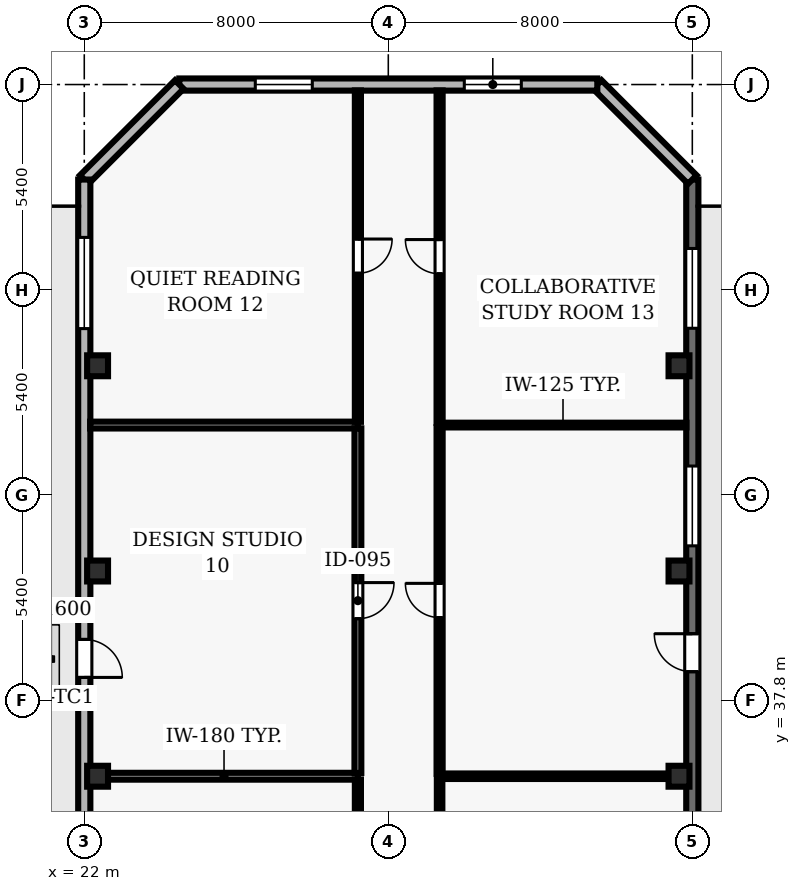
"""IFC4 building model, lengths in metres.
Left out: names, types, materials, properties, quantities, classifications, styles, units other than length and angle.
Written with IfcOpenShell. Run it as: python <this file> out.ifc"""

import sys

from ifc_helpers import new_model, si_unit, direction, frame, frame_2d, origin, origin_2d, place, context, subcontext, project, spatial, rectangle, hollow_rectangle, extrude, element, fill, save


model = new_model("IFC4")
c1 = context("Model", 3, precision=1e-05, world=origin(), true_north=direction((0.0, 1.0)))
c2 = subcontext(c1, "Body", "Model", "MODEL_VIEW")
j1 = project(units=[si_unit("LENGTHUNIT", "METRE"), si_unit("PLANEANGLEUNIT", "RADIAN")], contexts=[c1])
p1 = place(None, origin())
s1 = spatial("IfcSite", under=j1, at=p1, CompositionType="ELEMENT")
p2 = place(p1, origin())
s2 = spatial("IfcBuilding", under=s1, at=p2, CompositionType="ELEMENT")
p3 = place(p2, frame((0.0, 0.0, 34.9)))
s3 = spatial("IfcBuildingStorey", under=s2, at=p3, CompositionType="ELEMENT", Elevation=34.9)
for number, where, z_axis, x_axis in (
    (1, (22.35, 35.8, 0.0), (0.0, 0.0, 1.0), (1.0, 0.0, 0.0)),
    (2, (37.65, 35.8, 0.0), (0.0, 0.0, 1.0), (1.0, 0.0, 0.0)),
    (3, (22.35, 41.2, 0.0), (0.0, 0.0, 1.0), (1.0, 0.0, 0.0)),
    (4, (37.65, 41.2, 0.0), (0.0, 0.0, 1.0), (1.0, 0.0, 0.0)),
    (5, (22.35, 46.6, 0.0), (0.0, 0.0, 1.0), (1.0, 0.0, 0.0)),
    (6, (37.65, 46.6, 0.0), (0.0, 0.0, 1.0), (1.0, 0.0, 0.0)),
):
    element("IfcColumn", number, at=place(p3, frame(where, z_axis=z_axis, x_axis=x_axis)), inside=s3, PredefinedType="COLUMN", context=c2, shape_type="SweptSolid", body=[
        extrude(hollow_rectangle(XDim=0.55, YDim=0.55, WallThickness=0.025, at=origin_2d()), origin(), (0.0, 0.0, 1.0), 3.9),
    ])
p4 = place(p3, frame((38.0, 28.6, 0.0), z_axis=(0.0, 0.0, 1.0), x_axis=(0.0, 1.0, 0.0)))
e7 = element("IfcWall", 7, at=p4, inside=s3, PredefinedType="SOLIDWALL", context=c2, shape_type="SweptSolid", body=[
    extrude(rectangle(XDim=22.9, YDim=0.32, at=frame_2d((11.45, 0.0))), origin(), (0.0, 0.0, 1.0), 3.69),
])
p5 = place(p4, frame((9.95, 0.0, 0.0)))
e8 = element("IfcOpeningElement", 8, at=p5, cuts=e7, PredefinedType="OPENING", context=c2, shape_type="SweptSolid", body=[
    extrude(rectangle(XDim=1.0, YDim=2.2, at=frame_2d((0.5, 1.1))), frame((0.0, 0.17, 0.0), z_axis=(0.0, -1.0, 0.0), x_axis=(1.0, 0.0, 0.0)), (0.0, 0.0, 1.0), 0.34),
])
p6 = place(p4, frame((2.262, 0.0, 0.9)))
e9 = element("IfcOpeningElement", 9, at=p6, cuts=e7, PredefinedType="OPENING", context=c2, shape_type="SweptSolid", body=[
    extrude(rectangle(XDim=2.1, YDim=1.6, at=frame_2d((1.05, 0.8))), frame((0.0, 0.17, 0.0), z_axis=(0.0, -1.0, 0.0), x_axis=(1.0, 0.0, 0.0)), (0.0, 0.0, 1.0), 0.34),
])
p7 = place(p4, frame((13.262, 0.0, 0.9)))
e10 = element("IfcOpeningElement", 10, at=p7, cuts=e7, PredefinedType="OPENING", context=c2, shape_type="SweptSolid", body=[
    extrude(rectangle(XDim=2.1, YDim=1.6, at=frame_2d((1.05, 0.8))), frame((0.0, 0.17, 0.0), z_axis=(0.0, -1.0, 0.0), x_axis=(1.0, 0.0, 0.0)), (0.0, 0.0, 1.0), 0.34),
])
p8 = place(p4, frame((18.987, 0.0, 0.9)))
e11 = element("IfcOpeningElement", 11, at=p8, cuts=e7, PredefinedType="OPENING", context=c2, shape_type="SweptSolid", body=[
    extrude(rectangle(XDim=2.1, YDim=1.6, at=frame_2d((1.05, 0.8))), frame((0.0, 0.17, 0.0), z_axis=(0.0, -1.0, 0.0), x_axis=(1.0, 0.0, 0.0)), (0.0, 0.0, 1.0), 0.34),
])
p9 = place(p3, frame((38.0, 51.5, 0.0), z_axis=(0.0, 0.0, 1.0), x_axis=(-0.707106781187, 0.707106781187, 0.0)))
e12 = element("IfcWall", 12, at=p9, inside=s3, PredefinedType="SOLIDWALL", context=c2, shape_type="SweptSolid", body=[
    extrude(rectangle(XDim=3.536, YDim=0.32, at=frame_2d((1.768, 0.0))), origin(), (0.0, 0.0, 1.0), 3.69),
])
p10 = place(p3, frame((35.5, 54.0, 0.0), z_axis=(0.0, 0.0, 1.0), x_axis=(-1.0, 0.0, 0.0)))
e13 = element("IfcWall", 13, at=p10, inside=s3, PredefinedType="SOLIDWALL", context=c2, shape_type="SweptSolid", body=[
    extrude(rectangle(XDim=11.0, YDim=0.32, at=frame_2d((5.5, 0.0))), origin(), (0.0, 0.0, 1.0), 3.69),
])
p11 = place(p10, frame((2.0, 0.0, 0.9)))
e14 = element("IfcOpeningElement", 14, at=p11, cuts=e13, PredefinedType="OPENING", context=c2, shape_type="SweptSolid", body=[
    extrude(rectangle(XDim=1.5, YDim=1.8, at=frame_2d((0.75, 0.9))), frame((0.0, 0.17, 0.0), z_axis=(0.0, -1.0, 0.0), x_axis=(1.0, 0.0, 0.0)), (0.0, 0.0, 1.0), 0.34),
])
p12 = place(p10, frame((7.5, 0.0, 0.9)))
e15 = element("IfcOpeningElement", 15, at=p12, cuts=e13, PredefinedType="OPENING", context=c2, shape_type="SweptSolid", body=[
    extrude(rectangle(XDim=1.5, YDim=1.8, at=frame_2d((0.75, 0.9))), frame((0.0, 0.17, 0.0), z_axis=(0.0, -1.0, 0.0), x_axis=(1.0, 0.0, 0.0)), (0.0, 0.0, 1.0), 0.34),
])
p13 = place(p3, frame((24.5, 54.0, 0.0), z_axis=(0.0, 0.0, 1.0), x_axis=(-0.707106781187, -0.707106781187, 0.0)))
e16 = element("IfcWall", 16, at=p13, inside=s3, PredefinedType="SOLIDWALL", context=c2, shape_type="SweptSolid", body=[
    extrude(rectangle(XDim=3.536, YDim=0.32, at=frame_2d((1.768, 0.0))), origin(), (0.0, 0.0, 1.0), 3.69),
])
p14 = place(p3, frame((22.0, 51.5, 0.0), z_axis=(0.0, 0.0, 1.0), x_axis=(0.0, -1.0, 0.0)))
e17 = element("IfcWall", 17, at=p14, inside=s3, PredefinedType="SOLIDWALL", context=c2, shape_type="SweptSolid", body=[
    extrude(rectangle(XDim=49.0, YDim=0.32, at=frame_2d((24.5, 0.0))), origin(), (0.0, 0.0, 1.0), 3.69),
])
p15 = place(p14, frame((12.1, 0.0, 0.0)))
e18 = element("IfcOpeningElement", 18, at=p15, cuts=e17, PredefinedType="OPENING", context=c2, shape_type="SweptSolid", body=[
    extrude(rectangle(XDim=1.0, YDim=2.2, at=frame_2d((0.5, 1.1))), frame((0.0, 0.17, 0.0), z_axis=(0.0, -1.0, 0.0), x_axis=(1.0, 0.0, 0.0)), (0.0, 0.0, 1.0), 0.34),
])
p16 = place(p14, frame((1.522, 0.0, 0.9)))
e19 = element("IfcOpeningElement", 19, at=p16, cuts=e17, PredefinedType="OPENING", context=c2, shape_type="SweptSolid", body=[
    extrude(rectangle(XDim=2.4, YDim=1.8, at=frame_2d((1.2, 0.9))), frame((0.0, 0.17, 0.0), z_axis=(0.0, -1.0, 0.0), x_axis=(1.0, 0.0, 0.0)), (0.0, 0.0, 1.0), 0.34),
])
p17 = place(p14, frame((17.856, 0.0, 0.9)))
e20 = element("IfcOpeningElement", 20, at=p17, cuts=e17, PredefinedType="OPENING", context=c2, shape_type="SweptSolid", body=[
    extrude(rectangle(XDim=2.4, YDim=1.8, at=frame_2d((1.2, 0.9))), frame((0.0, 0.17, 0.0), z_axis=(0.0, -1.0, 0.0), x_axis=(1.0, 0.0, 0.0)), (0.0, 0.0, 1.0), 0.34),
])
p18 = place(p14, frame((22.4, 0.0, 0.9)))
e21 = element("IfcOpeningElement", 21, at=p18, cuts=e17, PredefinedType="OPENING", context=c2, shape_type="SweptSolid", body=[
    extrude(rectangle(XDim=2.4, YDim=1.8, at=frame_2d((1.2, 0.9))), frame((0.0, 0.17, 0.0), z_axis=(0.0, -1.0, 0.0), x_axis=(1.0, 0.0, 0.0)), (0.0, 0.0, 1.0), 0.34),
])
p19 = place(p14, frame((29.194, 0.0, 0.9)))
e22 = element("IfcOpeningElement", 22, at=p19, cuts=e17, PredefinedType="OPENING", context=c2, shape_type="SweptSolid", body=[
    extrude(rectangle(XDim=2.4, YDim=1.8, at=frame_2d((1.2, 0.9))), frame((0.0, 0.17, 0.0), z_axis=(0.0, -1.0, 0.0), x_axis=(1.0, 0.0, 0.0)), (0.0, 0.0, 1.0), 0.34),
])
p20 = place(p14, frame((33.289, 0.0, 0.9)))
e23 = element("IfcOpeningElement", 23, at=p20, cuts=e17, PredefinedType="OPENING", context=c2, shape_type="SweptSolid", body=[
    extrude(rectangle(XDim=2.4, YDim=1.8, at=frame_2d((1.2, 0.9))), frame((0.0, 0.17, 0.0), z_axis=(0.0, -1.0, 0.0), x_axis=(1.0, 0.0, 0.0)), (0.0, 0.0, 1.0), 0.34),
])
p21 = place(p14, frame((39.633, 0.0, 0.9)))
e24 = element("IfcOpeningElement", 24, at=p21, cuts=e17, PredefinedType="OPENING", context=c2, shape_type="SweptSolid", body=[
    extrude(rectangle(XDim=2.4, YDim=1.8, at=frame_2d((1.2, 0.9))), frame((0.0, 0.17, 0.0), z_axis=(0.0, -1.0, 0.0), x_axis=(1.0, 0.0, 0.0)), (0.0, 0.0, 1.0), 0.34),
])
p22 = place(p3, frame((29.2, 35.8, 0.0), z_axis=(0.0, 0.0, 1.0), x_axis=(-1.0, 0.0, 0.0)))
e25 = element("IfcWall", 25, at=p22, inside=s3, PredefinedType="PARTITIONING", context=c2, shape_type="SweptSolid", body=[
    extrude(rectangle(XDim=7.045, YDim=0.18, at=frame_2d((3.522, 0.0))), origin(), (0.0, 0.0, 1.0), 3.055),
])
p23 = place(p3, frame((29.2, 45.04, 0.0), z_axis=(0.0, 0.0, 1.0), x_axis=(-1.0, 0.0, 0.0)))
e26 = element("IfcWall", 26, at=p23, inside=s3, PredefinedType="PARTITIONING", context=c2, shape_type="SweptSolid", body=[
    extrude(rectangle(XDim=7.045, YDim=0.18, at=frame_2d((3.522, 0.0))), origin(), (0.0, 0.0, 1.0), 3.69),
])
p24 = place(p3, frame((37.845, 35.8, 0.0), z_axis=(0.0, 0.0, 1.0), x_axis=(-1.0, 0.0, 0.0)))
e27 = element("IfcWall", 27, at=p24, inside=s3, PredefinedType="PARTITIONING", context=c2, shape_type="SweptSolid", body=[
    extrude(rectangle(XDim=6.495, YDim=0.145, at=frame_2d((3.248, 0.0))), origin(), (0.0, 0.0, 1.0), 3.055),
])
p25 = place(p3, frame((37.845, 45.04, 0.0), z_axis=(0.0, 0.0, 1.0), x_axis=(-1.0, 0.0, 0.0)))
e28 = element("IfcWall", 28, at=p25, inside=s3, PredefinedType="PARTITIONING", context=c2, shape_type="SweptSolid", body=[
    extrude(rectangle(XDim=6.495, YDim=0.125, at=frame_2d((3.248, 0.0))), origin(), (0.0, 0.0, 1.0), 3.69),
])
p26 = place(p3, frame((29.2, 35.715, 0.0), z_axis=(0.0, 0.0, 1.0), x_axis=(0.0, -1.0, 0.0)))
e29 = element("IfcWall", 29, at=p26, inside=s3, PredefinedType="PARTITIONING", context=c2, shape_type="SweptSolid", body=[
    extrude(rectangle(XDim=9.64, YDim=0.16, at=frame_2d((4.82, 0.0))), origin(), (0.0, 0.0, 1.0), 3.69),
])
p27 = place(p26, frame((4.32, 0.0, 0.0)))
e30 = element("IfcOpeningElement", 30, at=p27, cuts=e29, PredefinedType="OPENING", context=c2, shape_type="SweptSolid", body=[
    extrude(rectangle(XDim=1.0, YDim=2.1, at=frame_2d((0.5, 1.05))), frame((0.0, 0.09, 0.0), z_axis=(0.0, -1.0, 0.0), x_axis=(1.0, 0.0, 0.0)), (0.0, 0.0, 1.0), 0.18),
])
p28 = place(p3, frame((29.2, 44.955, 0.0), z_axis=(0.0, 0.0, 1.0), x_axis=(0.0, -1.0, 0.0)))
e31 = element("IfcWall", 31, at=p28, inside=s3, PredefinedType="PARTITIONING", context=c2, shape_type="SweptSolid", body=[
    extrude(rectangle(XDim=9.07, YDim=0.18, at=frame_2d((4.535, 0.0))), origin(), (0.0, 0.0, 1.0), 3.69),
])
p29 = place(p28, frame((4.06, 0.0, 0.0)))
e32 = element("IfcOpeningElement", 32, at=p29, cuts=e31, PredefinedType="OPENING", context=c2, shape_type="SweptSolid", body=[
    extrude(rectangle(XDim=0.95, YDim=2.1, at=frame_2d((0.475, 1.05))), frame((0.0, 0.1, 0.0), z_axis=(0.0, -1.0, 0.0), x_axis=(1.0, 0.0, 0.0)), (0.0, 0.0, 1.0), 0.2),
])
p30 = place(p3, frame((29.2, 53.845, 0.0), z_axis=(0.0, 0.0, 1.0), x_axis=(0.0, -1.0, 0.0)))
e33 = element("IfcWall", 33, at=p30, inside=s3, PredefinedType="PARTITIONING", context=c2, shape_type="SweptSolid", body=[
    extrude(rectangle(XDim=8.72, YDim=0.16, at=frame_2d((4.36, 0.0))), origin(), (0.0, 0.0, 1.0), 3.69),
])
p31 = place(p30, frame((3.91, 0.0, 0.0)))
e34 = element("IfcOpeningElement", 34, at=p31, cuts=e33, PredefinedType="OPENING", context=c2, shape_type="SweptSolid", body=[
    extrude(rectangle(XDim=0.9, YDim=2.1, at=frame_2d((0.45, 1.05))), frame((0.0, 0.09, 0.0), z_axis=(0.0, -1.0, 0.0), x_axis=(1.0, 0.0, 0.0)), (0.0, 0.0, 1.0), 0.18),
])
p32 = place(p3, frame((31.35, 26.075, 0.0), z_axis=(0.0, 0.0, 1.0), x_axis=(0.0, 1.0, 0.0)))
e35 = element("IfcWall", 35, at=p32, inside=s3, PredefinedType="PARTITIONING", context=c2, shape_type="SweptSolid", body=[
    extrude(rectangle(XDim=9.657, YDim=0.145, at=frame_2d((4.829, 0.0))), origin(), (0.0, 0.0, 1.0), 3.69),
])
p33 = place(p32, frame((4.279, 0.0, 0.0)))
e36 = element("IfcOpeningElement", 36, at=p33, cuts=e35, PredefinedType="OPENING", context=c2, shape_type="SweptSolid", body=[
    extrude(rectangle(XDim=1.1, YDim=2.15, at=frame_2d((0.55, 1.075))), frame((0.0, 0.083, 0.0), z_axis=(0.0, -1.0, 0.0), x_axis=(1.0, 0.0, 0.0)), (0.0, 0.0, 1.0), 0.165),
])
p34 = place(p3, frame((31.35, 35.867, 0.0), z_axis=(0.0, 0.0, 1.0), x_axis=(0.0, 1.0, 0.0)))
e37 = element("IfcWall", 37, at=p34, inside=s3, PredefinedType="PARTITIONING", context=c2, shape_type="SweptSolid", body=[
    extrude(rectangle(XDim=9.116, YDim=0.16, at=frame_2d((4.558, 0.0))), origin(), (0.0, 0.0, 1.0), 3.69),
])
p35 = place(p34, frame((4.108, 0.0, 0.0)))
e38 = element("IfcOpeningElement", 38, at=p35, cuts=e37, PredefinedType="OPENING", context=c2, shape_type="SweptSolid", body=[
    extrude(rectangle(XDim=0.9, YDim=2.1, at=frame_2d((0.45, 1.05))), frame((0.0, 0.09, 0.0), z_axis=(0.0, -1.0, 0.0), x_axis=(1.0, 0.0, 0.0)), (0.0, 0.0, 1.0), 0.18),
])
p36 = place(p3, frame((31.35, 45.097, 0.0), z_axis=(0.0, 0.0, 1.0), x_axis=(0.0, 1.0, 0.0)))
e39 = element("IfcWall", 39, at=p36, inside=s3, PredefinedType="PARTITIONING", context=c2, shape_type="SweptSolid", body=[
    extrude(rectangle(XDim=8.748, YDim=0.16, at=frame_2d((4.374, 0.0))), origin(), (0.0, 0.0, 1.0), 3.69),
])
p37 = place(p36, frame((3.924, 0.0, 0.0)))
e40 = element("IfcOpeningElement", 40, at=p37, cuts=e39, PredefinedType="OPENING", context=c2, shape_type="SweptSolid", body=[
    extrude(rectangle(XDim=0.9, YDim=2.1, at=frame_2d((0.45, 1.05))), frame((0.0, 0.09, 0.0), z_axis=(0.0, -1.0, 0.0), x_axis=(1.0, 0.0, 0.0)), (0.0, 0.0, 1.0), 0.18),
])
p38 = place(p5, origin())
e41 = element("IfcDoor", 41, at=p38, inside=s3, OperationType="SINGLE_SWING_RIGHT", PredefinedType="DOOR", context=c2, shape_type="SweptSolid", body=[
    extrude(rectangle(XDim=1.0, YDim=2.2, at=frame_2d((0.5, 1.1))), frame((0.0, 0.025, 0.0), z_axis=(0.0, -1.0, 0.0), x_axis=(1.0, 0.0, 0.0)), (0.0, 0.0, 1.0), 0.05),
])
fill(e8, e41)
p39 = place(p7, origin())
e42 = element("IfcWindow", 42, at=p39, inside=s3, PartitioningType="SINGLE_PANEL", PredefinedType="WINDOW", context=c2, shape_type="SweptSolid", body=[
    extrude(rectangle(XDim=2.1, YDim=1.6, at=frame_2d((1.05, 0.8))), frame((0.0, 0.03, 0.0), z_axis=(0.0, -1.0, 0.0), x_axis=(1.0, 0.0, 0.0)), (0.0, 0.0, 1.0), 0.06),
])
fill(e10, e42)
p40 = place(p8, origin())
e43 = element("IfcWindow", 43, at=p40, inside=s3, PartitioningType="SINGLE_PANEL", PredefinedType="WINDOW", context=c2, shape_type="SweptSolid", body=[
    extrude(rectangle(XDim=2.1, YDim=1.6, at=frame_2d((1.05, 0.8))), frame((0.0, 0.03, 0.0), z_axis=(0.0, -1.0, 0.0), x_axis=(1.0, 0.0, 0.0)), (0.0, 0.0, 1.0), 0.06),
])
fill(e11, e43)
p41 = place(p11, origin())
e44 = element("IfcWindow", 44, at=p41, inside=s3, PartitioningType="SINGLE_PANEL", PredefinedType="WINDOW", context=c2, shape_type="SweptSolid", body=[
    extrude(rectangle(XDim=1.5, YDim=1.8, at=frame_2d((0.75, 0.9))), frame((0.0, 0.03, 0.0), z_axis=(0.0, -1.0, 0.0), x_axis=(1.0, 0.0, 0.0)), (0.0, 0.0, 1.0), 0.06),
])
fill(e14, e44)
p42 = place(p12, origin())
e45 = element("IfcWindow", 45, at=p42, inside=s3, PartitioningType="SINGLE_PANEL", PredefinedType="WINDOW", context=c2, shape_type="SweptSolid", body=[
    extrude(rectangle(XDim=1.5, YDim=1.8, at=frame_2d((0.75, 0.9))), frame((0.0, 0.03, 0.0), z_axis=(0.0, -1.0, 0.0), x_axis=(1.0, 0.0, 0.0)), (0.0, 0.0, 1.0), 0.06),
])
fill(e15, e45)
p43 = place(p15, origin())
e46 = element("IfcDoor", 46, at=p43, inside=s3, OperationType="SINGLE_SWING_RIGHT", PredefinedType="DOOR", context=c2, shape_type="SweptSolid", body=[
    extrude(rectangle(XDim=1.0, YDim=2.2, at=frame_2d((0.5, 1.1))), frame((0.0, 0.025, 0.0), z_axis=(0.0, -1.0, 0.0), x_axis=(1.0, 0.0, 0.0)), (0.0, 0.0, 1.0), 0.05),
])
fill(e18, e46)
p44 = place(p16, origin())
e47 = element("IfcWindow", 47, at=p44, inside=s3, PartitioningType="SINGLE_PANEL", PredefinedType="WINDOW", context=c2, shape_type="SweptSolid", body=[
    extrude(rectangle(XDim=2.4, YDim=1.8, at=frame_2d((1.2, 0.9))), frame((0.0, 0.03, 0.0), z_axis=(0.0, -1.0, 0.0), x_axis=(1.0, 0.0, 0.0)), (0.0, 0.0, 1.0), 0.06),
])
fill(e19, e47)
p45 = place(p29, origin())
e48 = element("IfcDoor", 48, at=p45, inside=s3, OperationType="SINGLE_SWING_LEFT", PredefinedType="DOOR", context=c2, shape_type="SweptSolid", body=[
    extrude(rectangle(XDim=0.95, YDim=2.1, at=frame_2d((0.475, 1.05))), frame((0.0, 0.025, 0.0), z_axis=(0.0, -1.0, 0.0), x_axis=(1.0, 0.0, 0.0)), (0.0, 0.0, 1.0), 0.05),
])
fill(e32, e48)
p46 = place(p35, origin())
e49 = element("IfcDoor", 49, at=p46, inside=s3, OperationType="SINGLE_SWING_RIGHT", PredefinedType="DOOR", context=c2, shape_type="SweptSolid", body=[
    extrude(rectangle(XDim=0.9, YDim=2.1, at=frame_2d((0.45, 1.05))), frame((0.0, 0.025, 0.0), z_axis=(0.0, -1.0, 0.0), x_axis=(1.0, 0.0, 0.0)), (0.0, 0.0, 1.0), 0.05),
])
fill(e38, e49)
p47 = place(p31, origin())
e50 = element("IfcDoor", 50, at=p47, inside=s3, OperationType="SINGLE_SWING_LEFT", PredefinedType="DOOR", context=c2, shape_type="SweptSolid", body=[
    extrude(rectangle(XDim=0.9, YDim=2.1, at=frame_2d((0.45, 1.05))), frame((0.0, 0.025, 0.0), z_axis=(0.0, -1.0, 0.0), x_axis=(1.0, 0.0, 0.0)), (0.0, 0.0, 1.0), 0.05),
])
fill(e34, e50)
p48 = place(p37, origin())
e51 = element("IfcDoor", 51, at=p48, inside=s3, OperationType="SINGLE_SWING_RIGHT", PredefinedType="DOOR", context=c2, shape_type="SweptSolid", body=[
    extrude(rectangle(XDim=0.9, YDim=2.1, at=frame_2d((0.45, 1.05))), frame((0.0, 0.025, 0.0), z_axis=(0.0, -1.0, 0.0), x_axis=(1.0, 0.0, 0.0)), (0.0, 0.0, 1.0), 0.05),
])
fill(e40, e51)
save(model, sys.argv[1])
